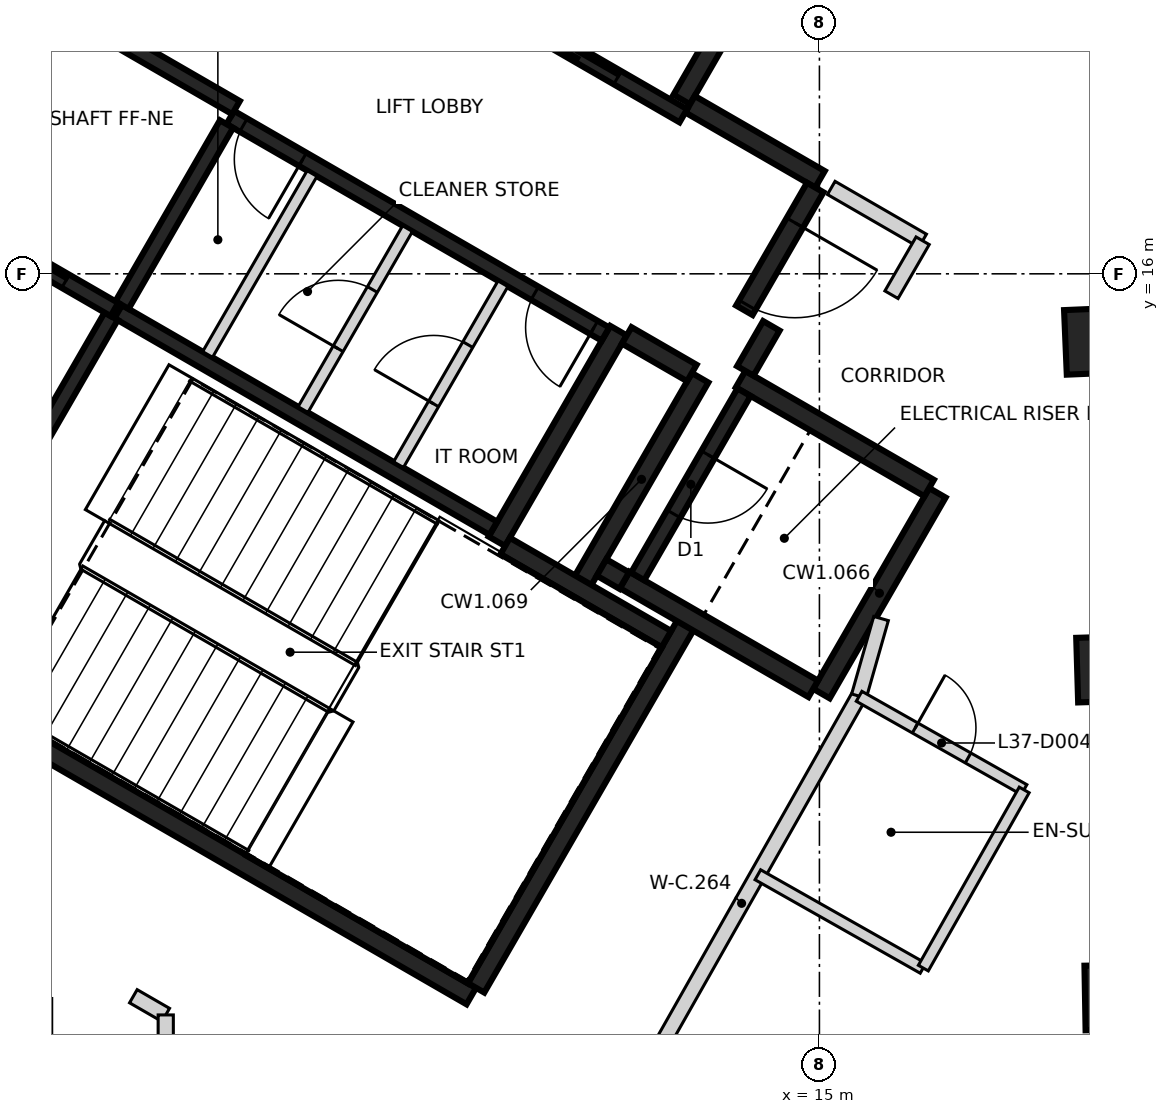
"""IFC4 building model, lengths in metres.
Left out: names, types, materials, properties, quantities, classifications, styles, units other than length and angle.
Written with IfcOpenShell. Run it as: python <this file> out.ifc"""

import sys

from ifc_helpers import new_model, si_unit, direction, frame, frame_2d, origin, origin_2d, place, context, subcontext, project, spatial, rectangle, extrude, element, fill, save


model = new_model("IFC4")
c1 = context("Model", 3, precision=1e-05, world=origin(), true_north=direction((0.0, 1.0)))
c2 = subcontext(c1, "Body", "Model", "MODEL_VIEW")
j1 = project(units=[si_unit("LENGTHUNIT", "METRE"), si_unit("PLANEANGLEUNIT", "RADIAN")], contexts=[c1])
p1 = place(None, origin())
s1 = spatial("IfcSite", under=j1, at=p1, CompositionType="ELEMENT")
p2 = place(p1, origin())
s2 = spatial("IfcBuilding", under=s1, at=p2, CompositionType="ELEMENT")
p3 = place(p2, frame((0.0, 0.0, 150.4)))
s3 = spatial("IfcBuildingStorey", under=s2, at=p3, CompositionType="ELEMENT", Elevation=150.4)
for number, where, z_axis, x_axis in (
    (1, (19.119, 6.484, -0.4), (0.0, 0.0, 1.0), (1.0, 0.018, 0.0)),
    (2, (19.016, 10.805, -0.4), (0.0, 0.0, 1.0), (1.0, 0.03, 0.0)),
    (3, (18.861, 15.124, -0.4), (0.0, 0.0, 1.0), (0.999, 0.042, 0.0)),
):
    element("IfcColumn", number, at=place(p3, frame(where, z_axis=z_axis, x_axis=x_axis)), inside=s3, PredefinedType="COLUMN", context=c2, shape_type="SweptSolid", body=[
        extrude(rectangle(XDim=1.25, YDim=0.85, at=origin_2d()), origin(), (0.0, 0.0, 1.0), 3.6),
    ])
p4 = place(p3, frame((10.42, 6.498, 0.0), z_axis=(0.0, 0.0, 1.0), x_axis=(-0.866021906294, 0.500006057782, 0.0)))
e4 = element("IfcWall", 4, at=p4, inside=s3, PredefinedType="SHEAR", context=c2, shape_type="SweptSolid", body=[
    extrude(rectangle(XDim=11.55, YDim=0.25, at=frame_2d((5.775, 0.0))), origin(), (0.0, 0.0, 1.0), 3.2),
])
p5 = place(p4, frame((10.025, 0.0, 0.0)))
e5 = element("IfcOpeningElement", 5, at=p5, cuts=e4, PredefinedType="OPENING", context=c2, shape_type="SweptSolid", body=[
    extrude(rectangle(XDim=1.2, YDim=2.1, at=frame_2d((0.6, 1.05))), frame((0.0, 0.135, 0.0), z_axis=(0.0, -1.0, 0.0), x_axis=(1.0, 0.0, 0.0)), (0.0, 0.0, 1.0), 0.27),
])
p6 = place(p4, frame((8.725, 0.0, 0.0)))
e6 = element("IfcOpeningElement", 6, at=p6, cuts=e4, PredefinedType="OPENING", context=c2, shape_type="SweptSolid", body=[
    extrude(rectangle(XDim=1.2, YDim=2.1, at=frame_2d((0.6, 1.05))), frame((0.0, 0.135, 0.0), z_axis=(0.0, -1.0, 0.0), x_axis=(1.0, 0.0, 0.0)), (0.0, 0.0, 1.0), 0.27),
])
p7 = place(p3, frame((3.179, 16.856, 0.0), z_axis=(0.0, 0.0, 1.0), x_axis=(0.500004234368, 0.866022959057, 0.0)))
e7 = element("IfcWall", 7, at=p7, inside=s3, PredefinedType="SHEAR", context=c2, shape_type="SweptSolid", body=[
    extrude(rectangle(XDim=6.25, YDim=0.25, at=frame_2d((3.125, 0.0))), origin(), (0.0, 0.0, 1.0), 3.2),
])
p8 = place(p3, frame((13.238, 11.378, 0.0), z_axis=(0.0, 0.0, 1.0), x_axis=(-0.500008851346, -0.866020293397, 0.0)))
e8 = element("IfcWall", 8, at=p8, inside=s3, PredefinedType="SHEAR", context=c2, shape_type="SweptSolid", body=[
    extrude(rectangle(XDim=5.51, YDim=0.25, at=frame_2d((2.755, 0.0))), origin(), (0.0, 0.0, 1.0), 3.2),
])
p9 = place(p3, frame((12.357, 15.252, 0.0), z_axis=(0.0, 0.0, 1.0), x_axis=(-0.500028443584, -0.866008981251, 0.0)))
e9 = element("IfcWall", 9, at=p9, inside=s3, PredefinedType="SHEAR", context=c2, shape_type="SweptSolid", body=[
    extrude(rectangle(XDim=3.2, YDim=0.25, at=frame_2d((1.6, 0.0))), origin(), (0.0, 0.0, 1.0), 3.2),
])
p10 = place(p3, frame((14.676, 20.87, 0.0), z_axis=(0.0, 0.0, 1.0), x_axis=(-0.499987686533, -0.866032512851, 0.0)))
e10 = element("IfcWall", 10, at=p10, inside=s3, PredefinedType="SHEAR", context=c2, shape_type="SweptSolid", body=[
    extrude(rectangle(XDim=2.975, YDim=0.25, at=frame_2d((1.487, 0.0))), origin(), (0.0, 0.0, 1.0), 3.2),
])
p11 = place(p3, frame((16.552, 13.119, 0.0), z_axis=(0.0, 0.0, 1.0), x_axis=(-0.499978833458, -0.866037623948, 0.0)))
e11 = element("IfcWall", 11, at=p11, inside=s3, PredefinedType="SHEAR", context=c2, shape_type="SweptSolid", body=[
    extrude(rectangle(XDim=3.05, YDim=0.25, at=frame_2d((1.525, 0.0))), origin(), (0.0, 0.0, 1.0), 3.2),
])
p12 = place(p3, frame((14.918, 10.54, 0.0), z_axis=(0.0, 0.0, 1.0), x_axis=(-0.866063538972, 0.499933942099, 0.0)))
e12 = element("IfcWall", 12, at=p12, inside=s3, PredefinedType="SHEAR", context=c2, shape_type="SweptSolid", body=[
    extrude(rectangle(XDim=2.865, YDim=0.25, at=frame_2d((1.432, 0.0))), origin(), (0.0, 0.0, 1.0), 3.2),
])
p13 = place(p3, frame((13.963, 14.614, 0.0), z_axis=(0.0, 0.0, 1.0), x_axis=(0.866042235819, -0.499970844928, 0.0)))
e13 = element("IfcWall", 13, at=p13, inside=s3, PredefinedType="SHEAR", context=c2, shape_type="SweptSolid", body=[
    extrude(rectangle(XDim=2.865, YDim=0.25, at=frame_2d((1.432, 0.0))), origin(), (0.0, 0.0, 1.0), 3.2),
])
p14 = place(p3, frame((11.888, 11.961, 0.0), z_axis=(0.0, 0.0, 1.0), x_axis=(0.500003324108, 0.866023484601, 0.0)))
e14 = element("IfcWall", 14, at=p14, inside=s3, PredefinedType="SHEAR", context=c2, shape_type="SweptSolid", body=[
    extrude(rectangle(XDim=3.085, YDim=0.25, at=frame_2d((1.542, 0.0))), origin(), (0.0, 0.0, 1.0), 3.2),
])
p15 = place(p3, frame((10.865, 12.418, 0.0), z_axis=(0.0, 0.0, 1.0), x_axis=(0.866026229868, -0.499998569178, 0.0)))
e15 = element("IfcWall", 15, at=p15, inside=s3, PredefinedType="SHEAR", context=c2, shape_type="SweptSolid", body=[
    extrude(rectangle(XDim=2.449, YDim=0.25, at=frame_2d((1.225, 0.0))), origin(), (0.0, 0.0, 1.0), 3.2),
])
p16 = place(p3, frame((13.297, 18.231, 0.0), z_axis=(0.0, 0.0, 1.0), x_axis=(0.866043531843, -0.499968599967, 0.0)))
e16 = element("IfcWall", 16, at=p16, inside=s3, PredefinedType="SHEAR", context=c2, shape_type="SweptSolid", body=[
    extrude(rectangle(XDim=1.975, YDim=0.25, at=frame_2d((0.987, 0.0))), origin(), (0.0, 0.0, 1.0), 3.2),
])
p17 = place(p3, frame((14.945, 17.135, 0.0), z_axis=(0.0, 0.0, 1.0), x_axis=(-0.499983108224, -0.866035156036, 0.0)))
e17 = element("IfcWall", 17, at=p17, inside=s3, PredefinedType="SHEAR", context=c2, shape_type="SweptSolid", body=[
    extrude(rectangle(XDim=1.865, YDim=0.25, at=frame_2d((0.932, 0.0))), origin(), (0.0, 0.0, 1.0), 3.2),
])
p18 = place(p17, frame((0.535, 0.0, 0.0)))
e18 = element("IfcOpeningElement", 18, at=p18, cuts=e17, PredefinedType="OPENING", context=c2, shape_type="SweptSolid", body=[
    extrude(rectangle(XDim=1.25, YDim=2.1, at=frame_2d((0.625, 1.05))), frame((0.0, 0.135, 0.0), z_axis=(0.0, -1.0, 0.0), x_axis=(1.0, 0.0, 0.0)), (0.0, 0.0, 1.0), 0.27),
])
p19 = place(p3, frame((13.322, 14.695, 0.0), z_axis=(0.0, 0.0, 1.0), x_axis=(-0.866017078145, 0.500014420154, 0.0)))
e19 = element("IfcWall", 19, at=p19, inside=s3, PredefinedType="SHEAR", context=c2, shape_type="SweptSolid", body=[
    extrude(rectangle(XDim=0.989, YDim=0.25, at=frame_2d((0.495, 0.0))), origin(), (0.0, 0.0, 1.0), 3.2),
])
p20 = place(p3, frame((14.368, 15.315, 0.0), z_axis=(0.0, 0.0, 1.0), x_axis=(-0.499897359611, -0.866084655132, 0.0)))
e20 = element("IfcWall", 20, at=p20, inside=s3, PredefinedType="SHEAR", context=c2, shape_type="SweptSolid", body=[
    extrude(rectangle(XDim=0.685, YDim=0.25, at=frame_2d((0.342, 0.0))), origin(), (0.0, 0.0, 1.0), 3.2),
])
p21 = place(p3, frame((12.433, 11.964, 0.0), z_axis=(0.0, 0.0, 1.0), x_axis=(-0.866055875208, 0.499947218231, 0.0)))
e21 = element("IfcWall", 21, at=p21, inside=s3, PredefinedType="SHEAR", context=c2, shape_type="SweptSolid", body=[
    extrude(rectangle(XDim=0.345, YDim=0.25, at=frame_2d((0.172, 0.0))), origin(), (0.0, 0.0, 1.0), 3.2),
])
p22 = place(p3, frame((13.21, 18.08, 0.0), z_axis=(0.0, 0.0, 1.0), x_axis=(-0.866030299012, 0.499991521122, 0.0)))
e22 = element("IfcWall", 22, at=p22, inside=s3, PredefinedType="SHEAR", context=c2, shape_type="SweptSolid", body=[
    extrude(rectangle(XDim=6.1, YDim=0.2, at=frame_2d((3.05, 0.0))), origin(), (0.0, 0.0, 1.0), 3.2),
])
p23 = place(p22, frame((1.0, 0.0, 0.0)))
e23 = element("IfcOpeningElement", 23, at=p23, cuts=e22, PredefinedType="OPENING", context=c2, shape_type="SweptSolid", body=[
    extrude(rectangle(XDim=1.2, YDim=2.1, at=frame_2d((0.6, 1.05))), frame((0.0, 0.11, 0.0), z_axis=(0.0, -1.0, 0.0), x_axis=(1.0, 0.0, 0.0)), (0.0, 0.0, 1.0), 0.22),
])
p24 = place(p22, frame((4.05, 0.0, 0.0)))
e24 = element("IfcOpeningElement", 24, at=p24, cuts=e22, PredefinedType="OPENING", context=c2, shape_type="SweptSolid", body=[
    extrude(rectangle(XDim=1.2, YDim=2.1, at=frame_2d((0.6, 1.05))), frame((0.0, 0.11, 0.0), z_axis=(0.0, -1.0, 0.0), x_axis=(1.0, 0.0, 0.0)), (0.0, 0.0, 1.0), 0.22),
])
p25 = place(p3, frame((5.775, 15.502, 0.0), z_axis=(0.0, 0.0, 1.0), x_axis=(0.866020080793, -0.500009219579, 0.0)))
e25 = element("IfcWall", 25, at=p25, inside=s3, PredefinedType="SHEAR", context=c2, shape_type="SweptSolid", body=[
    extrude(rectangle(XDim=5.699, YDim=0.2, at=frame_2d((2.85, 0.0))), origin(), (0.0, 0.0, 1.0), 3.2),
])
p26 = place(p3, frame((12.185, 15.207, 0.0), z_axis=(0.0, 0.0, 1.0), x_axis=(-0.866020080793, 0.500009219579, 0.0)))
e26 = element("IfcWall", 26, at=p26, inside=s3, PredefinedType="SHEAR", context=c2, shape_type="SweptSolid", body=[
    extrude(rectangle(XDim=5.699, YDim=0.2, at=frame_2d((2.85, 0.0))), origin(), (0.0, 0.0, 1.0), 3.2),
])
p27 = place(p26, frame((0.174, 0.0, 0.0)))
e27 = element("IfcOpeningElement", 27, at=p27, cuts=e26, PredefinedType="OPENING", context=c2, shape_type="SweptSolid", body=[
    extrude(rectangle(XDim=0.9, YDim=2.1, at=frame_2d((0.45, 1.05))), frame((0.0, 0.11, 0.0), z_axis=(0.0, -1.0, 0.0), x_axis=(1.0, 0.0, 0.0)), (0.0, 0.0, 1.0), 0.22),
])
p28 = place(p26, frame((4.599, 0.0, 0.0)))
e28 = element("IfcOpeningElement", 28, at=p28, cuts=e26, PredefinedType="OPENING", context=c2, shape_type="SweptSolid", body=[
    extrude(rectangle(XDim=0.9, YDim=2.1, at=frame_2d((0.45, 1.05))), frame((0.0, 0.11, 0.0), z_axis=(0.0, -1.0, 0.0), x_axis=(1.0, 0.0, 0.0)), (0.0, 0.0, 1.0), 0.22),
])
p29 = place(p3, frame((3.057, 10.895, 0.0), z_axis=(0.0, 0.0, 1.0), x_axis=(0.499989418164, 0.866031513124, 0.0)))
e29 = element("IfcWall", 29, at=p29, inside=s3, PredefinedType="SHEAR", context=c2, shape_type="SweptSolid", body=[
    extrude(rectangle(XDim=5.251, YDim=0.2, at=frame_2d((2.625, 0.0))), origin(), (0.0, 0.0, 1.0), 3.2),
])
p30 = place(p29, frame((1.849, 0.0, 0.0)))
e30 = element("IfcOpeningElement", 30, at=p30, cuts=e29, PredefinedType="OPENING", context=c2, shape_type="SweptSolid", body=[
    extrude(rectangle(XDim=1.4, YDim=2.1, at=frame_2d((0.7, 1.05))), frame((0.0, 0.11, 0.0), z_axis=(0.0, -1.0, 0.0), x_axis=(1.0, 0.0, 0.0)), (0.0, 0.0, 1.0), 0.22),
])
p31 = place(p3, frame((14.008, 14.442, 0.0), z_axis=(0.0, 0.0, 1.0), x_axis=(-0.499986818241, -0.866033014143, 0.0)))
e31 = element("IfcWall", 31, at=p31, inside=s3, PredefinedType="SHEAR", context=c2, shape_type="SweptSolid", body=[
    extrude(rectangle(XDim=2.798, YDim=0.2, at=frame_2d((1.399, 0.0))), origin(), (0.0, 0.0, 1.0), 3.2),
])
p32 = place(p31, frame((0.949, 0.0, 0.0)))
e32 = element("IfcOpeningElement", 32, at=p32, cuts=e31, PredefinedType="OPENING", context=c2, shape_type="SweptSolid", body=[
    extrude(rectangle(XDim=0.9, YDim=2.1, at=frame_2d((0.45, 1.05))), frame((0.0, 0.11, 0.0), z_axis=(0.0, -1.0, 0.0), x_axis=(1.0, 0.0, 0.0)), (0.0, 0.0, 1.0), 0.22),
])
p33 = place(p3, frame((7.199, 17.97, 0.0), z_axis=(0.0, 0.0, 1.0), x_axis=(-0.499968400327, -0.866043647095, 0.0)))
e33 = element("IfcWall", 33, at=p33, inside=s3, PredefinedType="SHEAR", context=c2, shape_type="SweptSolid", body=[
    extrude(rectangle(XDim=2.75, YDim=0.2, at=frame_2d((1.375, 0.0))), origin(), (0.0, 0.0, 1.0), 3.2),
])
p34 = place(p3, frame((5.725, 15.531, 0.0), z_axis=(0.0, 0.0, 1.0), x_axis=(-0.866037306777, 0.499979382845, 0.0)))
e34 = element("IfcWall", 34, at=p34, inside=s3, PredefinedType="SHEAR", context=c2, shape_type="SweptSolid", body=[
    extrude(rectangle(XDim=2.742, YDim=0.2, at=frame_2d((1.371, 0.0))), origin(), (0.0, 0.0, 1.0), 3.2),
])
p35 = place(p34, frame((0.743, 0.0, 0.0)))
e35 = element("IfcOpeningElement", 35, at=p35, cuts=e34, PredefinedType="OPENING", context=c2, shape_type="SweptSolid", body=[
    extrude(rectangle(XDim=1.3, YDim=2.1, at=frame_2d((0.65, 1.05))), frame((0.0, 0.11, 0.0), z_axis=(0.0, -1.0, 0.0), x_axis=(1.0, 0.0, 0.0)), (0.0, 0.0, 1.0), 0.22),
])
p36 = place(p3, frame((4.901, 19.586, 0.0), z_axis=(0.0, 0.0, 1.0), x_axis=(0.866022890907, -0.500004352405, 0.0)))
e36 = element("IfcWall", 36, at=p36, inside=s3, PredefinedType="SHEAR", context=c2, shape_type="SweptSolid", body=[
    extrude(rectangle(XDim=2.799, YDim=0.2, at=frame_2d((1.399, 0.0))), origin(), (0.0, 0.0, 1.0), 3.2),
])
p37 = place(p3, frame((9.462, 13.489, 0.0), z_axis=(0.0, 0.0, 1.0), x_axis=(0.50002746344, 0.86600954718, 0.0)))
e37 = element("IfcWall", 37, at=p37, inside=s3, PredefinedType="PARTITIONING", context=c2, shape_type="SweptSolid", body=[
    extrude(rectangle(XDim=2.748, YDim=0.15, at=frame_2d((1.374, 0.0))), origin(), (0.0, 0.0, 1.0), 3.2),
])
p38 = place(p37, frame((0.924, 0.0, 0.0)))
e38 = element("IfcOpeningElement", 38, at=p38, cuts=e37, PredefinedType="OPENING", context=c2, shape_type="SweptSolid", body=[
    extrude(rectangle(XDim=0.9, YDim=2.1, at=frame_2d((0.45, 1.05))), frame((0.0, 0.085, 0.0), z_axis=(0.0, -1.0, 0.0), x_axis=(1.0, 0.0, 0.0)), (0.0, 0.0, 1.0), 0.17),
])
p39 = place(p3, frame((8.207, 14.214, 0.0), z_axis=(0.0, 0.0, 1.0), x_axis=(0.499922376475, 0.866070215109, 0.0)))
e39 = element("IfcWall", 39, at=p39, inside=s3, PredefinedType="PARTITIONING", context=c2, shape_type="SweptSolid", body=[
    extrude(rectangle(XDim=2.749, YDim=0.15, at=frame_2d((1.374, 0.0))), origin(), (0.0, 0.0, 1.0), 3.2),
])
p40 = place(p39, frame((0.924, 0.0, 0.0)))
e40 = element("IfcOpeningElement", 40, at=p40, cuts=e39, PredefinedType="OPENING", context=c2, shape_type="SweptSolid", body=[
    extrude(rectangle(XDim=0.9, YDim=2.1, at=frame_2d((0.45, 1.05))), frame((0.0, 0.085, 0.0), z_axis=(0.0, -1.0, 0.0), x_axis=(1.0, 0.0, 0.0)), (0.0, 0.0, 1.0), 0.17),
])
p41 = place(p3, frame((6.951, 14.939, 0.0), z_axis=(0.0, 0.0, 1.0), x_axis=(0.50002746344, 0.86600954718, 0.0)))
e41 = element("IfcWall", 41, at=p41, inside=s3, PredefinedType="PARTITIONING", context=c2, shape_type="SweptSolid", body=[
    extrude(rectangle(XDim=2.748, YDim=0.15, at=frame_2d((1.374, 0.0))), origin(), (0.0, 0.0, 1.0), 3.2),
])
p42 = place(p3, frame((5.974, 6.496, 0.0), z_axis=(0.0, 0.0, 1.0), x_axis=(0.865788603161, -0.500409926597, 0.0)))
e42 = element("IfcWall", 42, at=p42, inside=s3, PredefinedType="PARTITIONING", context=c2, shape_type="SweptSolid", body=[
    extrude(rectangle(XDim=0.492, YDim=0.2, at=frame_2d((0.246, 0.0))), origin(), (0.0, 0.0, 1.0), 3.2),
])
p43 = place(p3, frame((6.4, -6.25, 0.0), z_axis=(0.0, 0.0, 1.0), x_axis=(0.0, 1.0, 0.0)))
e43 = element("IfcWall", 43, at=p43, inside=s3, PredefinedType="PARTITIONING", context=c2, shape_type="SweptSolid", body=[
    extrude(rectangle(XDim=12.5, YDim=0.2, at=frame_2d((6.25, 0.0))), origin(), (0.0, 0.0, 1.0), 3.2),
])
p44 = place(p43, frame((2.077, 0.0, 0.0)))
e44 = element("IfcOpeningElement", 44, at=p44, cuts=e43, PredefinedType="OPENING", context=c2, shape_type="SweptSolid", body=[
    extrude(rectangle(XDim=0.9, YDim=2.1, at=frame_2d((0.45, 1.05))), frame((0.0, 0.11, 0.0), z_axis=(0.0, -1.0, 0.0), x_axis=(1.0, 0.0, 0.0)), (0.0, 0.0, 1.0), 0.22),
])
p45 = place(p43, frame((8.315, 0.0, 0.0)))
e45 = element("IfcOpeningElement", 45, at=p45, cuts=e43, PredefinedType="OPENING", context=c2, shape_type="SweptSolid", body=[
    extrude(rectangle(XDim=0.9, YDim=2.1, at=frame_2d((0.45, 1.05))), frame((0.0, 0.11, 0.0), z_axis=(0.0, -1.0, 0.0), x_axis=(1.0, 0.0, 0.0)), (0.0, 0.0, 1.0), 0.22),
])
p46 = place(p3, frame((12.433, 4.992, 0.0), z_axis=(0.0, 0.0, 1.0), x_axis=(0.492572049538, 0.870271667937, 0.0)))
e46 = element("IfcWall", 46, at=p46, inside=s3, PredefinedType="PARTITIONING", context=c2, shape_type="SweptSolid", body=[
    extrude(rectangle(XDim=6.265, YDim=0.2, at=frame_2d((3.133, 0.0))), origin(), (0.0, 0.0, 1.0), 3.2),
])
p47 = place(p3, frame((15.156, 17.13, 0.0), z_axis=(0.0, 0.0, 1.0), x_axis=(0.865755062894, -0.500467952093, 0.0)))
e47 = element("IfcWall", 47, at=p47, inside=s3, PredefinedType="PARTITIONING", context=c2, shape_type="SweptSolid", body=[
    extrude(rectangle(XDim=1.389, YDim=0.2, at=frame_2d((0.694, 0.0))), origin(), (0.0, 0.0, 1.0), 3.2),
])
p48 = place(p3, frame((15.52, 10.445, 0.0), z_axis=(0.0, 0.0, 1.0), x_axis=(0.274143458758, 0.961688808306, 0.0)))
e48 = element("IfcWall", 48, at=p48, inside=s3, PredefinedType="PARTITIONING", context=c2, shape_type="SweptSolid", body=[
    extrude(rectangle(XDim=1.061, YDim=0.2, at=frame_2d((0.53, 0.0))), origin(), (0.0, 0.0, 1.0), 3.2),
])
p49 = place(p3, frame((15.948, 15.725, 0.0), z_axis=(0.0, 0.0, 1.0), x_axis=(0.500014611105, 0.866016967894, 0.0)))
e49 = element("IfcWall", 49, at=p49, inside=s3, PredefinedType="PARTITIONING", context=c2, shape_type="SweptSolid", body=[
    extrude(rectangle(XDim=0.82, YDim=0.2, at=frame_2d((0.41, 0.0))), origin(), (0.0, 0.0, 1.0), 3.2),
])
p50 = place(p3, frame((14.19, 8.094, 0.0), z_axis=(0.0, 0.0, 1.0), x_axis=(0.870269507955, -0.492575865754, 0.0)))
e50 = element("IfcWall", 50, at=p50, inside=s3, PredefinedType="PARTITIONING", context=c2, shape_type="SweptSolid", body=[
    extrude(rectangle(XDim=2.497, YDim=0.15, at=frame_2d((1.249, 0.0))), origin(), (0.0, 0.0, 1.0), 3.2),
])
p51 = place(p3, frame((15.522, 10.442, 0.0), z_axis=(0.0, 0.0, 1.0), x_axis=(0.870338423523, -0.492454087747, 0.0)))
e51 = element("IfcWall", 51, at=p51, inside=s3, PredefinedType="PARTITIONING", context=c2, shape_type="SweptSolid", body=[
    extrude(rectangle(XDim=2.493, YDim=0.15, at=frame_2d((1.247, 0.0))), origin(), (0.0, 0.0, 1.0), 3.2),
])
p52 = place(p51, frame((0.847, 0.0, 0.0)))
e52 = element("IfcOpeningElement", 52, at=p52, cuts=e51, PredefinedType="OPENING", context=c2, shape_type="SweptSolid", body=[
    extrude(rectangle(XDim=0.8, YDim=2.1, at=frame_2d((0.4, 1.05))), frame((0.0, 0.085, 0.0), z_axis=(0.0, -1.0, 0.0), x_axis=(1.0, 0.0, 0.0)), (0.0, 0.0, 1.0), 0.17),
])
p53 = place(p3, frame((16.367, 6.866, 0.0), z_axis=(0.0, 0.0, 1.0), x_axis=(0.492699238561, 0.870199666928, 0.0)))
e53 = element("IfcWall", 53, at=p53, inside=s3, PredefinedType="PARTITIONING", context=c2, shape_type="SweptSolid", body=[
    extrude(rectangle(XDim=2.694, YDim=0.15, at=frame_2d((1.347, 0.0))), origin(), (0.0, 0.0, 1.0), 3.2),
])
p54 = place(p35, origin())
e54 = element("IfcDoor", 54, at=p54, inside=s3, OperationType="SLIDING_TO_LEFT", PredefinedType="DOOR", context=c2, shape_type="SweptSolid", body=[
    extrude(rectangle(XDim=1.3, YDim=2.1, at=frame_2d((0.65, 1.05))), frame((0.0, 0.025, 0.0), z_axis=(0.0, -1.0, 0.0), x_axis=(1.0, 0.0, 0.0)), (0.0, 0.0, 1.0), 0.05),
])
fill(e35, e54)
p55 = place(p23, origin())
e55 = element("IfcDoor", 55, at=p55, inside=s3, OperationType="DOUBLE_DOOR_SLIDING", PredefinedType="DOOR", context=c2, shape_type="SweptSolid", body=[
    extrude(rectangle(XDim=1.2, YDim=2.1, at=frame_2d((0.6, 1.05))), frame((0.0, 0.025, 0.0), z_axis=(0.0, -1.0, 0.0), x_axis=(1.0, 0.0, 0.0)), (0.0, 0.0, 1.0), 0.05),
])
fill(e23, e55)
p56 = place(p18, origin())
e56 = element("IfcDoor", 56, at=p56, inside=s3, OperationType="SINGLE_SWING_LEFT", PredefinedType="DOOR", context=c2, shape_type="SweptSolid", body=[
    extrude(rectangle(XDim=1.25, YDim=2.1, at=frame_2d((0.625, 1.05))), frame((0.0, 0.025, 0.0), z_axis=(0.0, -1.0, 0.0), x_axis=(1.0, 0.0, 0.0)), (0.0, 0.0, 1.0), 0.05),
])
fill(e18, e56)
p57 = place(p27, origin())
e57 = element("IfcDoor", 57, at=p57, inside=s3, OperationType="SINGLE_SWING_RIGHT", PredefinedType="DOOR", context=c2, shape_type="SweptSolid", body=[
    extrude(rectangle(XDim=0.9, YDim=2.1, at=frame_2d((0.45, 1.05))), frame((0.0, 0.025, 0.0), z_axis=(0.0, -1.0, 0.0), x_axis=(1.0, 0.0, 0.0)), (0.0, 0.0, 1.0), 0.05),
])
fill(e27, e57)
p58 = place(p38, origin())
e58 = element("IfcDoor", 58, at=p58, inside=s3, OperationType="SINGLE_SWING_LEFT", PredefinedType="DOOR", context=c2, shape_type="SweptSolid", body=[
    extrude(rectangle(XDim=0.9, YDim=2.1, at=frame_2d((0.45, 1.05))), frame((0.0, 0.025, 0.0), z_axis=(0.0, -1.0, 0.0), x_axis=(1.0, 0.0, 0.0)), (0.0, 0.0, 1.0), 0.05),
])
fill(e38, e58)
p59 = place(p40, origin())
e59 = element("IfcDoor", 59, at=p59, inside=s3, OperationType="SINGLE_SWING_RIGHT", PredefinedType="DOOR", context=c2, shape_type="SweptSolid", body=[
    extrude(rectangle(XDim=0.9, YDim=2.1, at=frame_2d((0.45, 1.05))), frame((0.0, 0.025, 0.0), z_axis=(0.0, -1.0, 0.0), x_axis=(1.0, 0.0, 0.0)), (0.0, 0.0, 1.0), 0.05),
])
fill(e40, e59)
p60 = place(p28, origin())
e60 = element("IfcDoor", 60, at=p60, inside=s3, OperationType="SINGLE_SWING_LEFT", PredefinedType="DOOR", context=c2, shape_type="SweptSolid", body=[
    extrude(rectangle(XDim=0.9, YDim=2.1, at=frame_2d((0.45, 1.05))), frame((0.0, 0.025, 0.0), z_axis=(0.0, -1.0, 0.0), x_axis=(1.0, 0.0, 0.0)), (0.0, 0.0, 1.0), 0.05),
])
fill(e28, e60)
p61 = place(p32, origin())
e61 = element("IfcDoor", 61, at=p61, inside=s3, OperationType="SINGLE_SWING_RIGHT", PredefinedType="DOOR", context=c2, shape_type="SweptSolid", body=[
    extrude(rectangle(XDim=0.9, YDim=2.1, at=frame_2d((0.45, 1.05))), frame((0.0, 0.025, 0.0), z_axis=(0.0, -1.0, 0.0), x_axis=(1.0, 0.0, 0.0)), (0.0, 0.0, 1.0), 0.05),
])
fill(e32, e61)
p62 = place(p52, origin())
e62 = element("IfcDoor", 62, at=p62, inside=s3, OperationType="SINGLE_SWING_LEFT", PredefinedType="DOOR", context=c2, shape_type="SweptSolid", body=[
    extrude(rectangle(XDim=0.8, YDim=2.1, at=frame_2d((0.4, 1.05))), frame((0.0, 0.025, 0.0), z_axis=(0.0, -1.0, 0.0), x_axis=(1.0, 0.0, 0.0)), (0.0, 0.0, 1.0), 0.05),
])
fill(e52, e62)
save(model, sys.argv[1])
